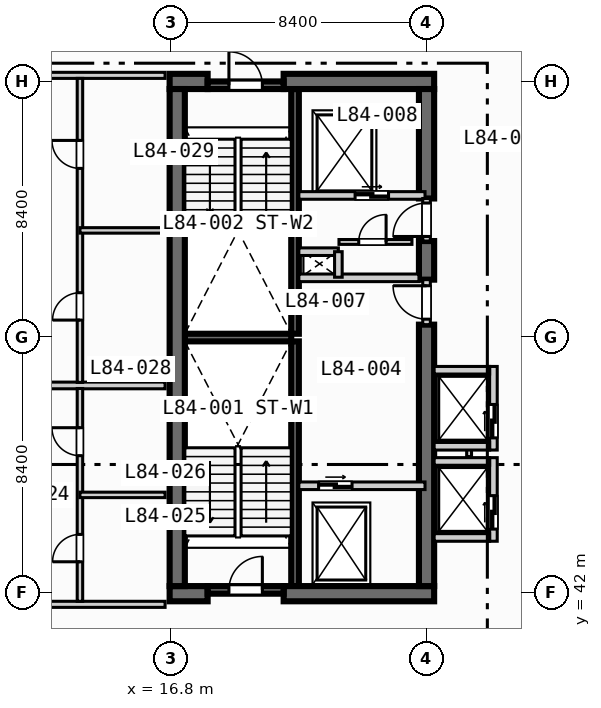
"""IFC4 building model, lengths in metres.
Left out: names, types, materials, properties, quantities, classifications, styles, units other than length and angle.
Written with IfcOpenShell. Run it as: python <this file> out.ifc"""

import sys

from ifc_helpers import new_model, si_unit, direction, frame, frame_2d, origin, place, context, subcontext, project, spatial, rectangle, extrude, element, fill, save


model = new_model("IFC4")
c1 = context("Model", 3, precision=1e-05, world=origin(), true_north=direction((0.0, 1.0)))
c2 = subcontext(c1, "Body", "Model", "MODEL_VIEW")
j1 = project(units=[si_unit("LENGTHUNIT", "METRE"), si_unit("PLANEANGLEUNIT", "RADIAN")], contexts=[c1])
p1 = place(None, origin())
s1 = spatial("IfcSite", under=j1, at=p1, CompositionType="ELEMENT")
p2 = place(p1, origin())
s2 = spatial("IfcBuilding", under=s1, at=p2, CompositionType="ELEMENT")
p3 = place(p2, frame((0.0, 0.0, 339.8)))
s3 = spatial("IfcBuildingStorey", under=s2, at=p3, CompositionType="ELEMENT", Elevation=339.8)
for number, where, z_axis, x_axis in (
    (1, (20.875, 42.2, 0.0), (0.0, 0.0, 1.0), (0.0, 1.0, 0.0)),
    (2, (20.875, 50.5, 0.0), (0.0, 0.0, 1.0), (0.0, 1.0, 0.0)),
):
    element("IfcWall", number, at=place(p3, frame(where, z_axis=z_axis, x_axis=x_axis)), inside=s3, PredefinedType="SOLIDWALL", context=c2, shape_type="SweptSolid", body=[
        extrude(rectangle(XDim=8.05, YDim=0.25, at=frame_2d((4.025, 0.0))), origin(), (0.0, 0.0, 1.0), 3.67),
    ])
p4 = place(p3, frame((17.25, 50.375, 0.0), z_axis=(0.0, 0.0, 1.0), x_axis=(1.0, 0.0, 0.0)))
e3 = element("IfcWall", 3, at=p4, inside=s3, PredefinedType="SOLIDWALL", context=c2, shape_type="SweptSolid", body=[
    extrude(rectangle(XDim=3.5, YDim=0.25, at=frame_2d((1.75, 0.0))), origin(), (0.0, 0.0, 1.0), 3.67),
])
p5 = place(p3, frame((16.75, 41.95, 0.0), z_axis=(0.0, 0.0, 1.0), x_axis=(1.0, 0.0, 0.0)))
e4 = element("IfcWall", 4, at=p5, inside=s3, PredefinedType="SHEAR", context=c2, shape_type="SweptSolid", body=[
    extrude(rectangle(XDim=1.25, YDim=0.5, at=frame_2d((0.625, 0.0))), origin(), (0.0, 0.0, 1.0), 3.67),
])
p6 = place(p3, frame((20.5, 41.95, 0.0), z_axis=(0.0, 0.0, 1.0), x_axis=(1.0, 0.0, 0.0)))
e5 = element("IfcWall", 5, at=p6, inside=s3, PredefinedType="SHEAR", context=c2, shape_type="SweptSolid", body=[
    extrude(rectangle(XDim=4.95, YDim=0.5, at=frame_2d((2.475, 0.0))), origin(), (0.0, 0.0, 1.0), 3.67),
])
p7 = place(p3, frame((16.75, 58.8, 0.0), z_axis=(0.0, 0.0, 1.0), x_axis=(1.0, 0.0, 0.0)))
e6 = element("IfcWall", 6, at=p7, inside=s3, PredefinedType="SHEAR", context=c2, shape_type="SweptSolid", body=[
    extrude(rectangle(XDim=1.25, YDim=0.5, at=frame_2d((0.625, 0.0))), origin(), (0.0, 0.0, 1.0), 3.67),
])
p8 = place(p3, frame((20.5, 58.8, 0.0), z_axis=(0.0, 0.0, 1.0), x_axis=(1.0, 0.0, 0.0)))
e7 = element("IfcWall", 7, at=p8, inside=s3, PredefinedType="SHEAR", context=c2, shape_type="SweptSolid", body=[
    extrude(rectangle(XDim=4.95, YDim=0.5, at=frame_2d((2.475, 0.0))), origin(), (0.0, 0.0, 1.0), 3.67),
])
p9 = place(p3, frame((17.0, 42.2, 0.0), z_axis=(0.0, 0.0, 1.0), x_axis=(0.0, 1.0, 0.0)))
e8 = element("IfcWall", 8, at=p9, inside=s3, PredefinedType="SHEAR", context=c2, shape_type="SweptSolid", body=[
    extrude(rectangle(XDim=16.35, YDim=0.5, at=frame_2d((8.175, 0.0))), origin(), (0.0, 0.0, 1.0), 3.67),
])
p10 = place(p3, frame((25.2, 42.2, 0.0), z_axis=(0.0, 0.0, 1.0), x_axis=(0.0, 1.0, 0.0)))
e9 = element("IfcWall", 9, at=p10, inside=s3, PredefinedType="SHEAR", context=c2, shape_type="SweptSolid", body=[
    extrude(rectangle(XDim=8.6, YDim=0.5, at=frame_2d((4.3, 0.0))), origin(), (0.0, 0.0, 1.0), 3.67),
])
p11 = place(p3, frame((25.2, 52.28, 0.0), z_axis=(0.0, 0.0, 1.0), x_axis=(0.0, 1.0, 0.0)))
e10 = element("IfcWall", 10, at=p11, inside=s3, PredefinedType="SHEAR", context=c2, shape_type="SweptSolid", body=[
    extrude(rectangle(XDim=1.27, YDim=0.5, at=frame_2d((0.635, 0.0))), origin(), (0.0, 0.0, 1.0), 3.67),
])
p12 = place(p3, frame((25.2, 54.95, 0.0), z_axis=(0.0, 0.0, 1.0), x_axis=(0.0, 1.0, 0.0)))
e11 = element("IfcWall", 11, at=p12, inside=s3, PredefinedType="SHEAR", context=c2, shape_type="SweptSolid", body=[
    extrude(rectangle(XDim=3.6, YDim=0.5, at=frame_2d((1.8, 0.0))), origin(), (0.0, 0.0, 1.0), 3.67),
])
p13 = place(p3, frame((18.0, 42.075, 0.0), z_axis=(0.0, 0.0, 1.0), x_axis=(1.0, 0.0, 0.0)))
e12 = element("IfcWall", 12, at=p13, inside=s3, PredefinedType="SOLIDWALL", context=c2, shape_type="SweptSolid", body=[
    extrude(rectangle(XDim=2.5, YDim=0.25, at=frame_2d((1.25, 0.0))), origin(), (0.0, 0.0, 1.0), 3.67),
])
p14 = place(p13, frame((0.7, 0.0, 0.0)))
e13 = element("IfcOpeningElement", 13, at=p14, cuts=e12, PredefinedType="OPENING", context=c2, shape_type="SweptSolid", body=[
    extrude(rectangle(XDim=1.1, YDim=2.15, at=frame_2d((0.55, 1.075))), frame((0.0, 0.135, 0.0), z_axis=(0.0, -1.0, 0.0), x_axis=(1.0, 0.0, 0.0)), (0.0, 0.0, 1.0), 0.27),
])
p15 = place(p3, frame((18.0, 58.675, 0.0), z_axis=(0.0, 0.0, 1.0), x_axis=(1.0, 0.0, 0.0)))
e14 = element("IfcWall", 14, at=p15, inside=s3, PredefinedType="SOLIDWALL", context=c2, shape_type="SweptSolid", body=[
    extrude(rectangle(XDim=2.5, YDim=0.25, at=frame_2d((1.25, 0.0))), origin(), (0.0, 0.0, 1.0), 3.67),
])
p16 = place(p15, frame((0.7, 0.0, 0.0)))
e15 = element("IfcOpeningElement", 15, at=p16, cuts=e14, PredefinedType="OPENING", context=c2, shape_type="SweptSolid", body=[
    extrude(rectangle(XDim=1.1, YDim=2.15, at=frame_2d((0.55, 1.075))), frame((0.0, 0.135, 0.0), z_axis=(0.0, -1.0, 0.0), x_axis=(1.0, 0.0, 0.0)), (0.0, 0.0, 1.0), 0.27),
])
p17 = place(p3, frame((21.0, 45.5, 0.0), z_axis=(0.0, 0.0, 1.0), x_axis=(1.0, 0.0, 0.0)))
e16 = element("IfcWall", 16, at=p17, inside=s3, PredefinedType="SOLIDWALL", context=c2, shape_type="SweptSolid", body=[
    extrude(rectangle(XDim=4.15, YDim=0.25, at=frame_2d((2.075, 0.0))), origin(), (0.0, 0.0, 1.0), 3.67),
])
p18 = place(p17, frame((0.65, 0.0, 0.0)))
e17 = element("IfcOpeningElement", 17, at=p18, cuts=e16, PredefinedType="OPENING", context=c2, shape_type="SweptSolid", body=[
    extrude(rectangle(XDim=1.1, YDim=2.15, at=frame_2d((0.55, 1.075))), frame((0.0, 0.135, 0.0), z_axis=(0.0, -1.0, 0.0), x_axis=(1.0, 0.0, 0.0)), (0.0, 0.0, 1.0), 0.27),
])
p19 = place(p3, frame((25.2, 50.8, 0.0), z_axis=(0.0, 0.0, 1.0), x_axis=(0.0, 1.0, 0.0)))
e18 = element("IfcWall", 18, at=p19, inside=s3, PredefinedType="SOLIDWALL", context=c2, shape_type="SweptSolid", body=[
    extrude(rectangle(XDim=1.48, YDim=0.25, at=frame_2d((0.74, 0.0))), origin(), (0.0, 0.0, 1.0), 3.67),
])
p20 = place(p19, frame((0.18, 0.0, 0.0)))
e19 = element("IfcOpeningElement", 19, at=p20, cuts=e18, PredefinedType="OPENING", context=c2, shape_type="SweptSolid", body=[
    extrude(rectangle(XDim=1.1, YDim=2.15, at=frame_2d((0.55, 1.075))), frame((0.0, 0.135, 0.0), z_axis=(0.0, -1.0, 0.0), x_axis=(1.0, 0.0, 0.0)), (0.0, 0.0, 1.0), 0.27),
])
p21 = place(p3, frame((21.0, 52.34, 0.0), z_axis=(0.0, 0.0, 1.0), x_axis=(1.0, 0.0, 0.0)))
e20 = element("IfcWall", 20, at=p21, inside=s3, PredefinedType="SOLIDWALL", context=c2, shape_type="SweptSolid", body=[
    extrude(rectangle(XDim=3.95, YDim=0.25, at=frame_2d((1.975, 0.0))), origin(), (0.0, 0.0, 1.0), 3.67),
])
p22 = place(p3, frame((21.0, 55.05, 0.0), z_axis=(0.0, 0.0, 1.0), x_axis=(1.0, 0.0, 0.0)))
e21 = element("IfcWall", 21, at=p22, inside=s3, PredefinedType="SOLIDWALL", context=c2, shape_type="SweptSolid", body=[
    extrude(rectangle(XDim=4.15, YDim=0.25, at=frame_2d((2.075, 0.0))), origin(), (0.0, 0.0, 1.0), 3.67),
])
p23 = place(p22, frame((1.85, 0.0, 0.0)))
e22 = element("IfcOpeningElement", 22, at=p23, cuts=e21, PredefinedType="OPENING", context=c2, shape_type="SweptSolid", body=[
    extrude(rectangle(XDim=1.1, YDim=2.15, at=frame_2d((0.55, 1.075))), frame((0.0, 0.135, 0.0), z_axis=(0.0, -1.0, 0.0), x_axis=(1.0, 0.0, 0.0)), (0.0, 0.0, 1.0), 0.27),
])
p24 = place(p3, frame((25.2, 53.55, 0.0), z_axis=(0.0, 0.0, 1.0), x_axis=(0.0, 1.0, 0.0)))
e23 = element("IfcWall", 23, at=p24, inside=s3, PredefinedType="SOLIDWALL", context=c2, shape_type="SweptSolid", body=[
    extrude(rectangle(XDim=1.4, YDim=0.25, at=frame_2d((0.7, 0.0))), origin(), (0.0, 0.0, 1.0), 3.67),
])
p25 = place(p24, frame((0.15, 0.0, 0.0)))
e24 = element("IfcOpeningElement", 24, at=p25, cuts=e23, PredefinedType="OPENING", context=c2, shape_type="SweptSolid", body=[
    extrude(rectangle(XDim=1.1, YDim=2.15, at=frame_2d((0.55, 1.075))), frame((0.0, 0.135, 0.0), z_axis=(0.0, -1.0, 0.0), x_axis=(1.0, 0.0, 0.0)), (0.0, 0.0, 1.0), 0.27),
])
p26 = place(p3, frame((21.0, 53.2, 0.0), z_axis=(0.0, 0.0, 1.0), x_axis=(1.0, 0.0, 0.0)))
e25 = element("IfcWall", 25, at=p26, inside=s3, PredefinedType="SOLIDWALL", context=c2, shape_type="SweptSolid", body=[
    extrude(rectangle(XDim=1.3, YDim=0.25, at=frame_2d((0.65, 0.0))), origin(), (0.0, 0.0, 1.0), 3.67),
])
p27 = place(p3, frame((22.3, 52.36, 0.0), z_axis=(0.0, 0.0, 1.0), x_axis=(0.0, 1.0, 0.0)))
e26 = element("IfcWall", 26, at=p27, inside=s3, PredefinedType="SOLIDWALL", context=c2, shape_type="SweptSolid", body=[
    extrude(rectangle(XDim=0.84, YDim=0.25, at=frame_2d((0.42, 0.0))), origin(), (0.0, 0.0, 1.0), 3.67),
])
p28 = place(p3, frame((22.32, 53.52, 0.0), z_axis=(0.0, 0.0, 1.0), x_axis=(1.0, 0.0, 0.0)))
e27 = element("IfcWall", 27, at=p28, inside=s3, PredefinedType="PARTITIONING", context=c2, shape_type="SweptSolid", body=[
    extrude(rectangle(XDim=2.4, YDim=0.16, at=frame_2d((1.2, 0.0))), origin(), (0.0, 0.0, 1.0), 3.67),
])
p29 = place(p28, frame((0.65, 0.0, 0.0)))
e28 = element("IfcOpeningElement", 28, at=p29, cuts=e27, PredefinedType="OPENING", context=c2, shape_type="SweptSolid", body=[
    extrude(rectangle(XDim=0.9, YDim=2.1, at=frame_2d((0.45, 1.05))), frame((0.0, 0.09, 0.0), z_axis=(0.0, -1.0, 0.0), x_axis=(1.0, 0.0, 0.0)), (0.0, 0.0, 1.0), 0.18),
])
p30 = place(p3, frame((27.4, 43.675, 0.0), z_axis=(0.0, 0.0, 1.0), x_axis=(0.0, 1.0, 0.0)))
e29 = element("IfcWall", 29, at=p30, inside=s3, PredefinedType="SOLIDWALL", context=c2, shape_type="SweptSolid", body=[
    extrude(rectangle(XDim=2.75, YDim=0.25, at=frame_2d((1.375, 0.0))), origin(), (0.0, 0.0, 1.0), 3.67),
])
p31 = place(p30, frame((0.4, 0.0, 0.0)))
e30 = element("IfcOpeningElement", 30, at=p31, cuts=e29, PredefinedType="OPENING", context=c2, shape_type="SweptSolid", body=[
    extrude(rectangle(XDim=1.1, YDim=2.15, at=frame_2d((0.55, 1.075))), frame((0.0, 0.135, 0.0), z_axis=(0.0, -1.0, 0.0), x_axis=(1.0, 0.0, 0.0)), (0.0, 0.0, 1.0), 0.27),
])
for number, where, z_axis, x_axis in (
    (31, (25.45, 43.8, 0.0), (0.0, 0.0, 1.0), (1.0, 0.0, 0.0)),
    (32, (25.45, 46.3, 0.0), (0.0, 0.0, 1.0), (1.0, 0.0, 0.0)),
):
    element("IfcWall", number, at=place(p3, frame(where, z_axis=z_axis, x_axis=x_axis)), inside=s3, PredefinedType="SOLIDWALL", context=c2, shape_type="SweptSolid", body=[
        extrude(rectangle(XDim=1.825, YDim=0.25, at=frame_2d((0.913, 0.0))), origin(), (0.0, 0.0, 1.0), 3.67),
    ])
p32 = place(p3, frame((26.6, 46.46, 0.0), z_axis=(0.0, 0.0, 1.0), x_axis=(0.0, 1.0, 0.0)))
e33 = element("IfcWall", 33, at=p32, inside=s3, PredefinedType="PARTITIONING", context=c2, shape_type="SweptSolid", body=[
    extrude(rectangle(XDim=0.88, YDim=0.16, at=frame_2d((0.44, 0.0))), origin(), (0.0, 0.0, 1.0), 3.67),
])
p33 = place(p3, frame((27.4, 46.675, 0.0), z_axis=(0.0, 0.0, 1.0), x_axis=(0.0, 1.0, 0.0)))
e34 = element("IfcWall", 34, at=p33, inside=s3, PredefinedType="SOLIDWALL", context=c2, shape_type="SweptSolid", body=[
    extrude(rectangle(XDim=2.75, YDim=0.25, at=frame_2d((1.375, 0.0))), origin(), (0.0, 0.0, 1.0), 3.67),
])
p34 = place(p33, frame((0.4, 0.0, 0.0)))
e35 = element("IfcOpeningElement", 35, at=p34, cuts=e34, PredefinedType="OPENING", context=c2, shape_type="SweptSolid", body=[
    extrude(rectangle(XDim=1.1, YDim=2.15, at=frame_2d((0.55, 1.075))), frame((0.0, 0.135, 0.0), z_axis=(0.0, -1.0, 0.0), x_axis=(1.0, 0.0, 0.0)), (0.0, 0.0, 1.0), 0.27),
])
for number, where, z_axis, x_axis in (
    (36, (25.45, 46.8, 0.0), (0.0, 0.0, 1.0), (1.0, 0.0, 0.0)),
    (37, (25.45, 49.3, 0.0), (0.0, 0.0, 1.0), (1.0, 0.0, 0.0)),
):
    element("IfcWall", number, at=place(p3, frame(where, z_axis=z_axis, x_axis=x_axis)), inside=s3, PredefinedType="SOLIDWALL", context=c2, shape_type="SweptSolid", body=[
        extrude(rectangle(XDim=1.825, YDim=0.25, at=frame_2d((0.913, 0.0))), origin(), (0.0, 0.0, 1.0), 3.67),
    ])
p35 = place(p3, frame((8.65, 41.6, 0.0), z_axis=(0.0, 0.0, 1.0), x_axis=(1.0, 0.0, 0.0)))
e38 = element("IfcWall", 38, at=p35, inside=s3, PredefinedType="PARTITIONING", context=c2, shape_type="SweptSolid", body=[
    extrude(rectangle(XDim=7.95, YDim=0.2, at=frame_2d((3.975, 0.0))), origin(), (0.0, 0.0, 1.0), 3.67),
])
p36 = place(p35, frame((2.0, 0.0, 0.0)))
e39 = element("IfcOpeningElement", 39, at=p36, cuts=e38, PredefinedType="OPENING", context=c2, shape_type="SweptSolid", body=[
    extrude(rectangle(XDim=1.0, YDim=2.15, at=frame_2d((0.5, 1.075))), frame((0.0, 0.11, 0.0), z_axis=(0.0, -1.0, 0.0), x_axis=(1.0, 0.0, 0.0)), (0.0, 0.0, 1.0), 0.22),
])
p37 = place(p3, frame((8.65, 59.0, 0.0), z_axis=(0.0, 0.0, 1.0), x_axis=(1.0, 0.0, 0.0)))
e40 = element("IfcWall", 40, at=p37, inside=s3, PredefinedType="PARTITIONING", context=c2, shape_type="SweptSolid", body=[
    extrude(rectangle(XDim=7.95, YDim=0.2, at=frame_2d((3.975, 0.0))), origin(), (0.0, 0.0, 1.0), 3.07),
])
p38 = place(p37, frame((2.0, 0.0, 0.0)))
e41 = element("IfcOpeningElement", 41, at=p38, cuts=e40, PredefinedType="OPENING", context=c2, shape_type="SweptSolid", body=[
    extrude(rectangle(XDim=1.0, YDim=2.15, at=frame_2d((0.5, 1.075))), frame((0.0, 0.11, 0.0), z_axis=(0.0, -1.0, 0.0), x_axis=(1.0, 0.0, 0.0)), (0.0, 0.0, 1.0), 0.22),
])
p39 = place(p3, frame((8.65, 48.8, 0.0), z_axis=(0.0, 0.0, 1.0), x_axis=(1.0, 0.0, 0.0)))
e42 = element("IfcWall", 42, at=p39, inside=s3, PredefinedType="PARTITIONING", context=c2, shape_type="SweptSolid", body=[
    extrude(rectangle(XDim=7.95, YDim=0.22, at=frame_2d((3.975, 0.0))), origin(), (0.0, 0.0, 1.0), 3.67),
])
p40 = place(p3, frame((13.8, 41.7, 0.0), z_axis=(0.0, 0.0, 1.0), x_axis=(0.0, 1.0, 0.0)))
e43 = element("IfcWall", 43, at=p40, inside=s3, PredefinedType="PLUMBINGWALL", context=c2, shape_type="SweptSolid", body=[
    extrude(rectangle(XDim=7.0, YDim=0.18, at=frame_2d((3.5, 0.0))), origin(), (0.0, 0.0, 1.0), 3.67),
])
p41 = place(p40, frame((1.3, 0.0, 0.0)))
e44 = element("IfcOpeningElement", 44, at=p41, cuts=e43, PredefinedType="OPENING", context=c2, shape_type="SweptSolid", body=[
    extrude(rectangle(XDim=0.9, YDim=2.1, at=frame_2d((0.45, 1.05))), frame((0.0, 0.1, 0.0), z_axis=(0.0, -1.0, 0.0), x_axis=(1.0, 0.0, 0.0)), (0.0, 0.0, 1.0), 0.2),
])
p42 = place(p40, frame((4.79, 0.0, 0.0)))
e45 = element("IfcOpeningElement", 45, at=p42, cuts=e43, PredefinedType="OPENING", context=c2, shape_type="SweptSolid", body=[
    extrude(rectangle(XDim=0.92, YDim=2.1, at=frame_2d((0.46, 1.05))), frame((0.0, 0.1, 0.0), z_axis=(0.0, -1.0, 0.0), x_axis=(1.0, 0.0, 0.0)), (0.0, 0.0, 1.0), 0.2),
])
p43 = place(p3, frame((13.8, 45.2, 0.0), z_axis=(0.0, 0.0, 1.0), x_axis=(1.0, 0.0, 0.0)))
e46 = element("IfcWall", 46, at=p43, inside=s3, PredefinedType="PLUMBINGWALL", context=c2, shape_type="SweptSolid", body=[
    extrude(rectangle(XDim=2.8, YDim=0.18, at=frame_2d((1.4, 0.0))), origin(), (0.0, 0.0, 1.0), 3.67),
])
p44 = place(p3, frame((13.8, 48.9, 0.0), z_axis=(0.0, 0.0, 1.0), x_axis=(0.0, 1.0, 0.0)))
e47 = element("IfcWall", 47, at=p44, inside=s3, PredefinedType="PLUMBINGWALL", context=c2, shape_type="SweptSolid", body=[
    extrude(rectangle(XDim=10.0, YDim=0.18, at=frame_2d((5.0, 0.0))), origin(), (0.0, 0.0, 1.0), 3.67),
])
p45 = place(p44, frame((2.05, 0.0, 0.0)))
e48 = element("IfcOpeningElement", 48, at=p45, cuts=e47, PredefinedType="OPENING", context=c2, shape_type="SweptSolid", body=[
    extrude(rectangle(XDim=0.9, YDim=2.1, at=frame_2d((0.45, 1.05))), frame((0.0, 0.1, 0.0), z_axis=(0.0, -1.0, 0.0), x_axis=(1.0, 0.0, 0.0)), (0.0, 0.0, 1.0), 0.2),
])
p46 = place(p44, frame((7.04, 0.0, 0.0)))
e49 = element("IfcOpeningElement", 49, at=p46, cuts=e47, PredefinedType="OPENING", context=c2, shape_type="SweptSolid", body=[
    extrude(rectangle(XDim=0.92, YDim=2.1, at=frame_2d((0.46, 1.05))), frame((0.0, 0.1, 0.0), z_axis=(0.0, -1.0, 0.0), x_axis=(1.0, 0.0, 0.0)), (0.0, 0.0, 1.0), 0.2),
])
p47 = place(p3, frame((13.8, 53.9, 0.0), z_axis=(0.0, 0.0, 1.0), x_axis=(1.0, 0.0, 0.0)))
e50 = element("IfcWall", 50, at=p47, inside=s3, PredefinedType="PLUMBINGWALL", context=c2, shape_type="SweptSolid", body=[
    extrude(rectangle(XDim=2.8, YDim=0.18, at=frame_2d((1.4, 0.0))), origin(), (0.0, 0.0, 1.0), 3.67),
])
p48 = place(p14, origin())
e51 = element("IfcDoor", 51, at=p48, inside=s3, OperationType="SINGLE_SWING_RIGHT", PredefinedType="DOOR", context=c2, shape_type="SweptSolid", body=[
    extrude(rectangle(XDim=1.1, YDim=2.15, at=frame_2d((0.55, 1.075))), frame((0.0, 0.025, 0.0), z_axis=(0.0, -1.0, 0.0), x_axis=(1.0, 0.0, 0.0)), (0.0, 0.0, 1.0), 0.05),
])
fill(e13, e51)
p49 = place(p16, origin())
e52 = element("IfcDoor", 52, at=p49, inside=s3, OperationType="SINGLE_SWING_LEFT", PredefinedType="DOOR", context=c2, shape_type="SweptSolid", body=[
    extrude(rectangle(XDim=1.1, YDim=2.15, at=frame_2d((0.55, 1.075))), frame((0.0, 0.025, 0.0), z_axis=(0.0, -1.0, 0.0), x_axis=(1.0, 0.0, 0.0)), (0.0, 0.0, 1.0), 0.05),
])
fill(e15, e52)
p50 = place(p18, origin())
e53 = element("IfcDoor", 53, at=p50, inside=s3, OperationType="SLIDING_TO_LEFT", PredefinedType="DOOR", context=c2, shape_type="SweptSolid", body=[
    extrude(rectangle(XDim=1.1, YDim=2.15, at=frame_2d((0.55, 1.075))), frame((0.0, 0.025, 0.0), z_axis=(0.0, -1.0, 0.0), x_axis=(1.0, 0.0, 0.0)), (0.0, 0.0, 1.0), 0.05),
])
fill(e17, e53)
p51 = place(p20, origin())
e54 = element("IfcDoor", 54, at=p51, inside=s3, OperationType="SINGLE_SWING_RIGHT", PredefinedType="DOOR", context=c2, shape_type="SweptSolid", body=[
    extrude(rectangle(XDim=1.1, YDim=2.15, at=frame_2d((0.55, 1.075))), frame((0.0, 0.025, 0.0), z_axis=(0.0, -1.0, 0.0), x_axis=(1.0, 0.0, 0.0)), (0.0, 0.0, 1.0), 0.05),
])
fill(e19, e54)
p52 = place(p23, origin())
e55 = element("IfcDoor", 55, at=p52, inside=s3, OperationType="SLIDING_TO_LEFT", PredefinedType="DOOR", context=c2, shape_type="SweptSolid", body=[
    extrude(rectangle(XDim=1.1, YDim=2.15, at=frame_2d((0.55, 1.075))), frame((0.0, 0.025, 0.0), z_axis=(0.0, -1.0, 0.0), x_axis=(1.0, 0.0, 0.0)), (0.0, 0.0, 1.0), 0.05),
])
fill(e22, e55)
p53 = place(p25, origin())
e56 = element("IfcDoor", 56, at=p53, inside=s3, OperationType="SINGLE_SWING_LEFT", PredefinedType="DOOR", context=c2, shape_type="SweptSolid", body=[
    extrude(rectangle(XDim=1.1, YDim=2.15, at=frame_2d((0.55, 1.075))), frame((0.0, 0.025, 0.0), z_axis=(0.0, -1.0, 0.0), x_axis=(1.0, 0.0, 0.0)), (0.0, 0.0, 1.0), 0.05),
])
fill(e24, e56)
p54 = place(p29, origin())
e57 = element("IfcDoor", 57, at=p54, inside=s3, OperationType="SINGLE_SWING_RIGHT", PredefinedType="DOOR", context=c2, shape_type="SweptSolid", body=[
    extrude(rectangle(XDim=0.9, YDim=2.1, at=frame_2d((0.45, 1.05))), frame((0.0, 0.025, 0.0), z_axis=(0.0, -1.0, 0.0), x_axis=(1.0, 0.0, 0.0)), (0.0, 0.0, 1.0), 0.05),
])
fill(e28, e57)
p55 = place(p31, origin())
e58 = element("IfcDoor", 58, at=p55, inside=s3, OperationType="SLIDING_TO_LEFT", PredefinedType="DOOR", context=c2, shape_type="SweptSolid", body=[
    extrude(rectangle(XDim=1.1, YDim=2.15, at=frame_2d((0.55, 1.075))), frame((0.0, 0.025, 0.0), z_axis=(0.0, -1.0, 0.0), x_axis=(1.0, 0.0, 0.0)), (0.0, 0.0, 1.0), 0.05),
])
fill(e30, e58)
p56 = place(p34, origin())
e59 = element("IfcDoor", 59, at=p56, inside=s3, OperationType="SLIDING_TO_LEFT", PredefinedType="DOOR", context=c2, shape_type="SweptSolid", body=[
    extrude(rectangle(XDim=1.1, YDim=2.15, at=frame_2d((0.55, 1.075))), frame((0.0, 0.025, 0.0), z_axis=(0.0, -1.0, 0.0), x_axis=(1.0, 0.0, 0.0)), (0.0, 0.0, 1.0), 0.05),
])
fill(e35, e59)
p57 = place(p41, origin())
e60 = element("IfcDoor", 60, at=p57, inside=s3, OperationType="SINGLE_SWING_LEFT", PredefinedType="DOOR", context=c2, shape_type="SweptSolid", body=[
    extrude(rectangle(XDim=0.9, YDim=2.1, at=frame_2d((0.45, 1.05))), frame((0.0, 0.025, 0.0), z_axis=(0.0, -1.0, 0.0), x_axis=(1.0, 0.0, 0.0)), (0.0, 0.0, 1.0), 0.05),
])
fill(e44, e60)
p58 = place(p42, origin())
e61 = element("IfcDoor", 61, at=p58, inside=s3, OperationType="SINGLE_SWING_RIGHT", PredefinedType="DOOR", context=c2, shape_type="SweptSolid", body=[
    extrude(rectangle(XDim=0.92, YDim=2.1, at=frame_2d((0.46, 1.05))), frame((0.0, 0.025, 0.0), z_axis=(0.0, -1.0, 0.0), x_axis=(1.0, 0.0, 0.0)), (0.0, 0.0, 1.0), 0.05),
])
fill(e45, e61)
p59 = place(p45, origin())
e62 = element("IfcDoor", 62, at=p59, inside=s3, OperationType="SINGLE_SWING_LEFT", PredefinedType="DOOR", context=c2, shape_type="SweptSolid", body=[
    extrude(rectangle(XDim=0.9, YDim=2.1, at=frame_2d((0.45, 1.05))), frame((0.0, 0.025, 0.0), z_axis=(0.0, -1.0, 0.0), x_axis=(1.0, 0.0, 0.0)), (0.0, 0.0, 1.0), 0.05),
])
fill(e48, e62)
p60 = place(p46, origin())
e63 = element("IfcDoor", 63, at=p60, inside=s3, OperationType="SINGLE_SWING_RIGHT", PredefinedType="DOOR", context=c2, shape_type="SweptSolid", body=[
    extrude(rectangle(XDim=0.92, YDim=2.1, at=frame_2d((0.46, 1.05))), frame((0.0, 0.025, 0.0), z_axis=(0.0, -1.0, 0.0), x_axis=(1.0, 0.0, 0.0)), (0.0, 0.0, 1.0), 0.05),
])
fill(e49, e63)
save(model, sys.argv[1])
